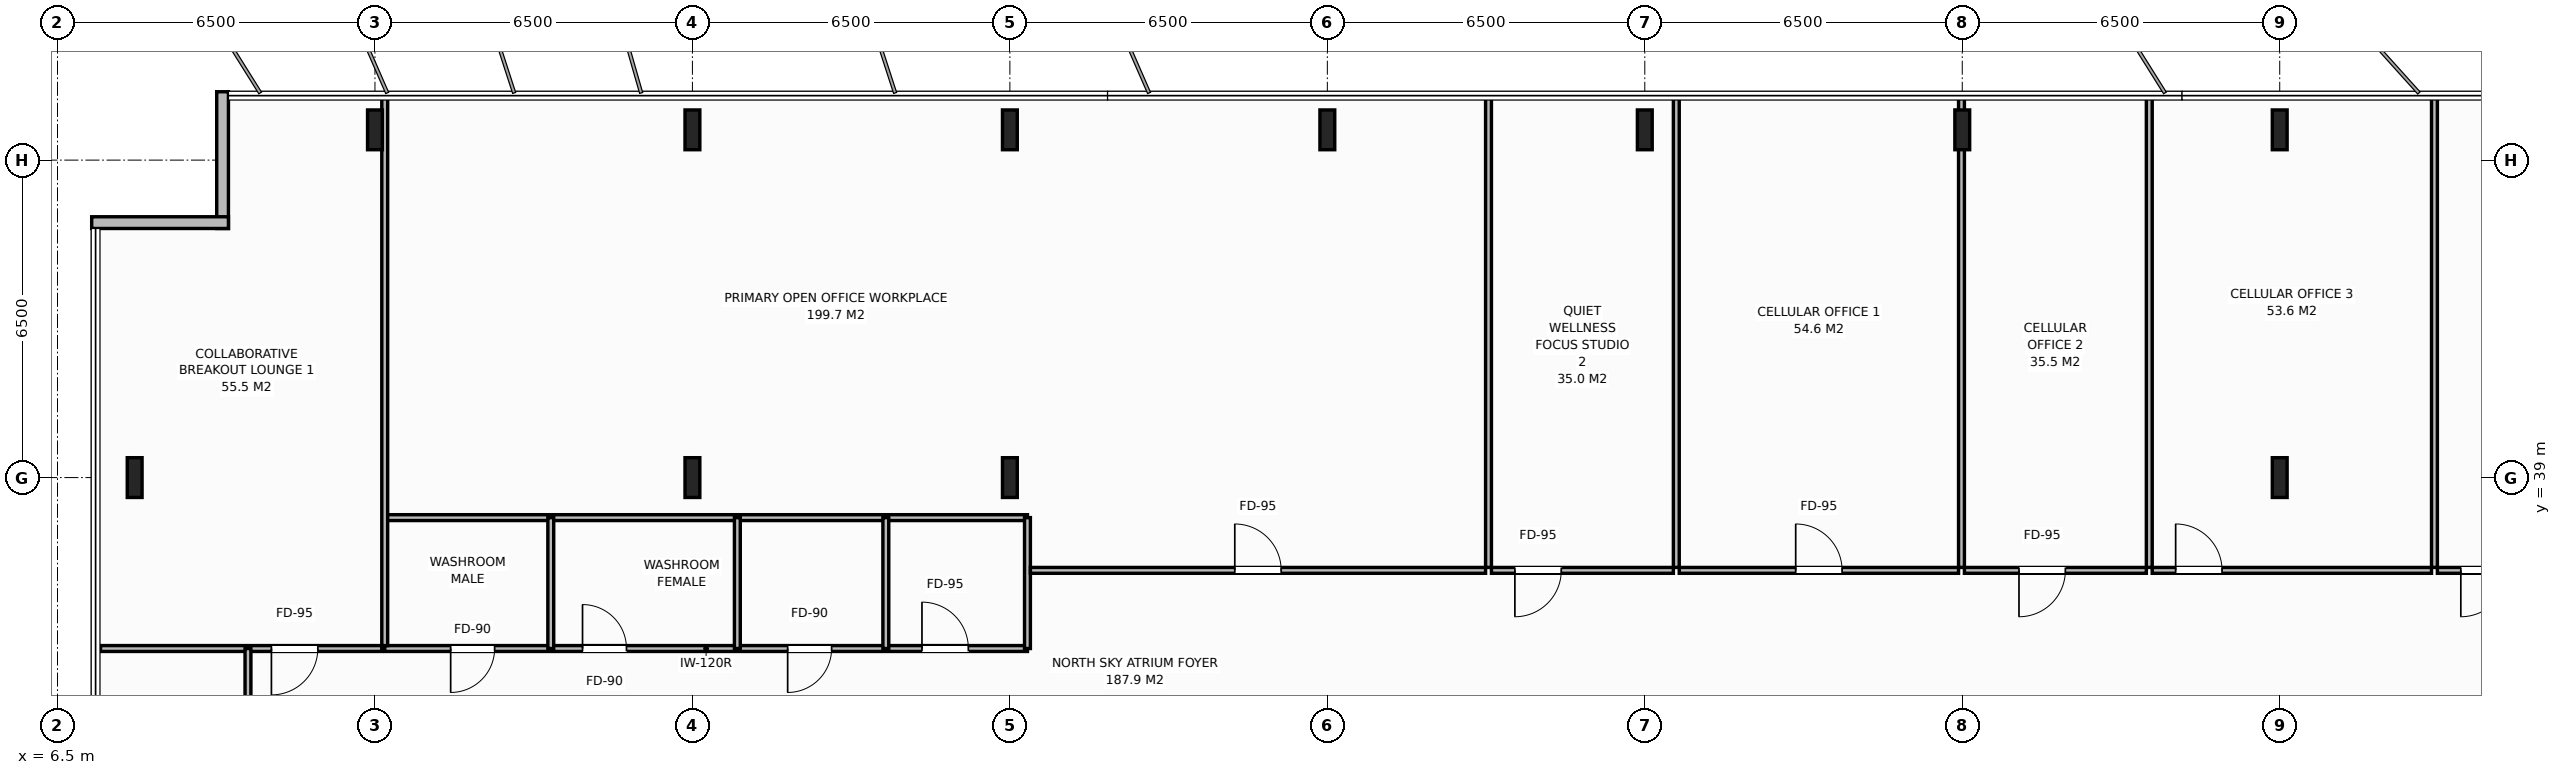
"""IFC4 building model, lengths in metres.
Left out: names, types, materials, properties, quantities, classifications, styles, units other than length and angle.
Written with IfcOpenShell. Run it as: python <this file> out.ifc"""

import sys

from ifc_helpers import new_model, si_unit, direction, frame, frame_2d, origin, origin_2d, place, context, subcontext, project, spatial, rectangle, i_section, extrude, element, fill, save


model = new_model("IFC4")
c1 = context("Model", 3, precision=1e-05, world=origin(), true_north=direction((0.0, 1.0)))
c2 = subcontext(c1, "Body", "Model", "MODEL_VIEW")
j1 = project(units=[si_unit("LENGTHUNIT", "METRE"), si_unit("PLANEANGLEUNIT", "RADIAN")], contexts=[c1])
p1 = place(None, origin())
s1 = spatial("IfcSite", under=j1, at=p1, CompositionType="ELEMENT")
p2 = place(p1, origin())
s2 = spatial("IfcBuilding", under=s1, at=p2, CompositionType="ELEMENT")
p3 = place(p2, frame((0.0, 0.0, 255.6)))
s3 = spatial("IfcBuildingStorey", under=s2, at=p3, CompositionType="ELEMENT", Elevation=255.6)
for number, where, z_axis, x_axis in (
    (1, (19.5, 39.0, 0.0), (0.0, 0.0, 1.0), (1.0, 0.0, 0.0)),
    (2, (26.0, 39.0, 0.0), (0.0, 0.0, 1.0), (1.0, 0.0, 0.0)),
    (3, (52.0, 39.0, 0.0), (0.0, 0.0, 1.0), (1.0, 0.0, 0.0)),
    (4, (13.0, 46.12, 0.0), (0.0, 0.0, 1.0), (1.0, 0.0, 0.0)),
    (5, (19.5, 46.12, 0.0), (0.0, 0.0, 1.0), (1.0, 0.0, 0.0)),
    (6, (26.0, 46.12, 0.0), (0.0, 0.0, 1.0), (1.0, 0.0, 0.0)),
    (7, (32.5, 46.12, 0.0), (0.0, 0.0, 1.0), (1.0, 0.0, 0.0)),
    (8, (39.0, 46.12, 0.0), (0.0, 0.0, 1.0), (1.0, 0.0, 0.0)),
    (9, (45.5, 46.12, 0.0), (0.0, 0.0, 1.0), (1.0, 0.0, 0.0)),
    (10, (52.0, 46.12, 0.0), (0.0, 0.0, 1.0), (1.0, 0.0, 0.0)),
    (11, (8.08, 39.0, 0.0), (0.0, 0.0, 1.0), (1.0, 0.0, 0.0)),
):
    element("IfcColumn", number, at=place(p3, frame(where, z_axis=z_axis, x_axis=x_axis)), inside=s3, PredefinedType="COLUMN", context=c2, shape_type="SweptSolid", body=[
        extrude(i_section(OverallWidth=0.303, OverallDepth=0.814, WebThickness=0.021, FlangeThickness=0.04, at=origin_2d()), origin(), (0.0, 0.0, 1.0), 3.8),
    ])
p4 = place(p3, frame((9.88, 44.1, 0.0), z_axis=(0.0, 0.0, 1.0), x_axis=(0.0, 1.0, 0.0)))
e12 = element("IfcWall", 12, at=p4, inside=s3, PredefinedType="STANDARD", context=c2, shape_type="SweptSolid", body=[
    extrude(rectangle(XDim=2.8, YDim=0.24, at=frame_2d((1.4, 0.0))), origin(), (0.0, 0.0, 1.0), 3.588),
])
p5 = place(p3, frame((7.2, 44.22, 0.0), z_axis=(0.0, 0.0, 1.0), x_axis=(1.0, 0.0, 0.0)))
e13 = element("IfcWall", 13, at=p5, inside=s3, PredefinedType="STANDARD", context=c2, shape_type="SweptSolid", body=[
    extrude(rectangle(XDim=2.8, YDim=0.24, at=frame_2d((1.4, 0.0))), origin(), (0.0, 0.0, 1.0), 3.588),
])
p6 = place(p3, frame((13.2, 35.5, 0.0), z_axis=(0.0, 0.0, 1.0), x_axis=(1.0, 0.0, 0.0)))
e14 = element("IfcWall", 14, at=p6, inside=s3, PredefinedType="PARTITIONING", context=c2, shape_type="SweptSolid", body=[
    extrude(rectangle(XDim=13.16, YDim=0.12, at=frame_2d((6.58, 0.0))), origin(), (0.0, 0.0, 1.0), 3.588),
])
p7 = place(p6, frame((1.35, 0.0, 0.0)))
e15 = element("IfcOpeningElement", 15, at=p7, cuts=e14, PredefinedType="OPENING", context=c2, shape_type="SweptSolid", body=[
    extrude(rectangle(XDim=0.9, YDim=2.15, at=frame_2d((0.45, 1.075))), frame((0.0, 0.07, 0.0), z_axis=(0.0, -1.0, 0.0), x_axis=(1.0, 0.0, 0.0)), (0.0, 0.0, 1.0), 0.14),
])
p8 = place(p6, frame((4.05, 0.0, 0.0)))
e16 = element("IfcOpeningElement", 16, at=p8, cuts=e14, PredefinedType="OPENING", context=c2, shape_type="SweptSolid", body=[
    extrude(rectangle(XDim=0.9, YDim=2.15, at=frame_2d((0.45, 1.075))), frame((0.0, 0.07, 0.0), z_axis=(0.0, -1.0, 0.0), x_axis=(1.0, 0.0, 0.0)), (0.0, 0.0, 1.0), 0.14),
])
p9 = place(p6, frame((8.25, 0.0, 0.0)))
e17 = element("IfcOpeningElement", 17, at=p9, cuts=e14, PredefinedType="OPENING", context=c2, shape_type="SweptSolid", body=[
    extrude(rectangle(XDim=0.9, YDim=2.15, at=frame_2d((0.45, 1.075))), frame((0.0, 0.07, 0.0), z_axis=(0.0, -1.0, 0.0), x_axis=(1.0, 0.0, 0.0)), (0.0, 0.0, 1.0), 0.14),
])
p10 = place(p6, frame((11.0, 0.0, 0.0)))
e18 = element("IfcOpeningElement", 18, at=p10, cuts=e14, PredefinedType="OPENING", context=c2, shape_type="SweptSolid", body=[
    extrude(rectangle(XDim=0.95, YDim=2.15, at=frame_2d((0.475, 1.075))), frame((0.0, 0.07, 0.0), z_axis=(0.0, -1.0, 0.0), x_axis=(1.0, 0.0, 0.0)), (0.0, 0.0, 1.0), 0.14),
])
p11 = place(p3, frame((13.2, 38.18, 0.0), z_axis=(0.0, 0.0, 1.0), x_axis=(1.0, 0.0, 0.0)))
e19 = element("IfcWall", 19, at=p11, inside=s3, PredefinedType="PARTITIONING", context=c2, shape_type="SweptSolid", body=[
    extrude(rectangle(XDim=13.16, YDim=0.12, at=frame_2d((6.58, 0.0))), origin(), (0.0, 0.0, 1.0), 3.588),
])
for number, where, z_axis, x_axis in (
    (20, (16.6, 35.5, 0.0), (0.0, 0.0, 1.0), (0.0, 1.0, 0.0)),
    (21, (20.42, 35.5, 0.0), (0.0, 0.0, 1.0), (0.0, 1.0, 0.0)),
    (22, (23.46, 35.5, 0.0), (0.0, 0.0, 1.0), (0.0, 1.0, 0.0)),
    (23, (26.36, 35.5, 0.0), (0.0, 0.0, 1.0), (0.0, 1.0, 0.0)),
):
    element("IfcWall", number, at=place(p3, frame(where, z_axis=z_axis, x_axis=x_axis)), inside=s3, PredefinedType="PARTITIONING", context=c2, shape_type="SweptSolid", body=[
        extrude(rectangle(XDim=2.68, YDim=0.12, at=frame_2d((1.34, 0.0))), origin(), (0.0, 0.0, 1.0), 3.588),
    ])
p12 = place(p3, frame((13.2, 35.56, 0.0), z_axis=(0.0, 0.0, 1.0), x_axis=(0.0, 1.0, 0.0)))
e24 = element("IfcWall", 24, at=p12, inside=s3, PredefinedType="PARTITIONING", context=c2, shape_type="SweptSolid", body=[
    extrude(rectangle(XDim=11.32, YDim=0.12, at=frame_2d((5.66, 0.0))), origin(), (0.0, 0.0, 1.0), 2.788),
])
p13 = place(p3, frame((7.38, 35.5, 0.0), z_axis=(0.0, 0.0, 1.0), x_axis=(1.0, 0.0, 0.0)))
e25 = element("IfcWall", 25, at=p13, inside=s3, PredefinedType="PARTITIONING", context=c2, shape_type="SweptSolid", body=[
    extrude(rectangle(XDim=5.76, YDim=0.12, at=frame_2d((2.88, 0.0))), origin(), (0.0, 0.0, 1.0), 3.588),
])
p14 = place(p13, frame((3.5, 0.0, 0.0)))
e26 = element("IfcOpeningElement", 26, at=p14, cuts=e25, PredefinedType="OPENING", context=c2, shape_type="SweptSolid", body=[
    extrude(rectangle(XDim=0.95, YDim=2.15, at=frame_2d((0.475, 1.075))), frame((0.0, 0.07, 0.0), z_axis=(0.0, -1.0, 0.0), x_axis=(1.0, 0.0, 0.0)), (0.0, 0.0, 1.0), 0.14),
])
p15 = place(p3, frame((35.8, 37.16, 0.0), z_axis=(0.0, 0.0, 1.0), x_axis=(0.0, 1.0, 0.0)))
e27 = element("IfcWall", 27, at=p15, inside=s3, PredefinedType="PARTITIONING", context=c2, shape_type="SweptSolid", body=[
    extrude(rectangle(XDim=9.72, YDim=0.12, at=frame_2d((4.86, 0.0))), origin(), (0.0, 0.0, 1.0), 3.588),
])
p16 = place(p3, frame((26.42, 37.1, 0.0), z_axis=(0.0, 0.0, 1.0), x_axis=(1.0, 0.0, 0.0)))
e28 = element("IfcWall", 28, at=p16, inside=s3, PredefinedType="PARTITIONING", context=c2, shape_type="SweptSolid", body=[
    extrude(rectangle(XDim=9.32, YDim=0.12, at=frame_2d((4.66, 0.0))), origin(), (0.0, 0.0, 1.0), 3.588),
])
p17 = place(p16, frame((4.185, 0.0, 0.0)))
e29 = element("IfcOpeningElement", 29, at=p17, cuts=e28, PredefinedType="OPENING", context=c2, shape_type="SweptSolid", body=[
    extrude(rectangle(XDim=0.95, YDim=2.15, at=frame_2d((0.475, 1.075))), frame((0.0, 0.07, 0.0), z_axis=(0.0, -1.0, 0.0), x_axis=(1.0, 0.0, 0.0)), (0.0, 0.0, 1.0), 0.14),
])
p18 = place(p3, frame((39.645, 37.16, 0.0), z_axis=(0.0, 0.0, 1.0), x_axis=(0.0, 1.0, 0.0)))
e30 = element("IfcWall", 30, at=p18, inside=s3, PredefinedType="PARTITIONING", context=c2, shape_type="SweptSolid", body=[
    extrude(rectangle(XDim=9.72, YDim=0.12, at=frame_2d((4.86, 0.0))), origin(), (0.0, 0.0, 1.0), 3.588),
])
p19 = place(p3, frame((35.86, 37.1, 0.0), z_axis=(0.0, 0.0, 1.0), x_axis=(1.0, 0.0, 0.0)))
e31 = element("IfcWall", 31, at=p19, inside=s3, PredefinedType="PARTITIONING", context=c2, shape_type="SweptSolid", body=[
    extrude(rectangle(XDim=3.725, YDim=0.12, at=frame_2d((1.863, 0.0))), origin(), (0.0, 0.0, 1.0), 3.588),
])
p20 = place(p19, frame((0.48, 0.0, 0.0)))
e32 = element("IfcOpeningElement", 32, at=p20, cuts=e31, PredefinedType="OPENING", context=c2, shape_type="SweptSolid", body=[
    extrude(rectangle(XDim=0.95, YDim=2.15, at=frame_2d((0.475, 1.075))), frame((0.0, 0.07, 0.0), z_axis=(0.0, -1.0, 0.0), x_axis=(1.0, 0.0, 0.0)), (0.0, 0.0, 1.0), 0.14),
])
p21 = place(p3, frame((45.484, 37.16, 0.0), z_axis=(0.0, 0.0, 1.0), x_axis=(0.0, 1.0, 0.0)))
e33 = element("IfcWall", 33, at=p21, inside=s3, PredefinedType="PARTITIONING", context=c2, shape_type="SweptSolid", body=[
    extrude(rectangle(XDim=9.72, YDim=0.12, at=frame_2d((4.86, 0.0))), origin(), (0.0, 0.0, 1.0), 2.788),
])
p22 = place(p3, frame((39.705, 37.1, 0.0), z_axis=(0.0, 0.0, 1.0), x_axis=(1.0, 0.0, 0.0)))
e34 = element("IfcWall", 34, at=p22, inside=s3, PredefinedType="PARTITIONING", context=c2, shape_type="SweptSolid", body=[
    extrude(rectangle(XDim=5.719, YDim=0.12, at=frame_2d((2.859, 0.0))), origin(), (0.0, 0.0, 1.0), 3.588),
])
p23 = place(p22, frame((2.385, 0.0, 0.0)))
e35 = element("IfcOpeningElement", 35, at=p23, cuts=e34, PredefinedType="OPENING", context=c2, shape_type="SweptSolid", body=[
    extrude(rectangle(XDim=0.95, YDim=2.15, at=frame_2d((0.475, 1.075))), frame((0.0, 0.07, 0.0), z_axis=(0.0, -1.0, 0.0), x_axis=(1.0, 0.0, 0.0)), (0.0, 0.0, 1.0), 0.14),
])
p24 = place(p3, frame((49.329, 37.16, 0.0), z_axis=(0.0, 0.0, 1.0), x_axis=(0.0, 1.0, 0.0)))
e36 = element("IfcWall", 36, at=p24, inside=s3, PredefinedType="PARTITIONING", context=c2, shape_type="SweptSolid", body=[
    extrude(rectangle(XDim=9.72, YDim=0.12, at=frame_2d((4.86, 0.0))), origin(), (0.0, 0.0, 1.0), 3.588),
])
p25 = place(p3, frame((45.544, 37.1, 0.0), z_axis=(0.0, 0.0, 1.0), x_axis=(1.0, 0.0, 0.0)))
e37 = element("IfcWall", 37, at=p25, inside=s3, PredefinedType="PARTITIONING", context=c2, shape_type="SweptSolid", body=[
    extrude(rectangle(XDim=3.725, YDim=0.12, at=frame_2d((1.863, 0.0))), origin(), (0.0, 0.0, 1.0), 3.588),
])
p26 = place(p25, frame((1.117, 0.0, 0.0)))
e38 = element("IfcOpeningElement", 38, at=p26, cuts=e37, PredefinedType="OPENING", context=c2, shape_type="SweptSolid", body=[
    extrude(rectangle(XDim=0.95, YDim=2.15, at=frame_2d((0.475, 1.075))), frame((0.0, 0.07, 0.0), z_axis=(0.0, -1.0, 0.0), x_axis=(1.0, 0.0, 0.0)), (0.0, 0.0, 1.0), 0.14),
])
p27 = place(p3, frame((55.168, 37.16, 0.0), z_axis=(0.0, 0.0, 1.0), x_axis=(0.0, 1.0, 0.0)))
e39 = element("IfcWall", 39, at=p27, inside=s3, PredefinedType="PARTITIONING", context=c2, shape_type="SweptSolid", body=[
    extrude(rectangle(XDim=9.72, YDim=0.12, at=frame_2d((4.86, 0.0))), origin(), (0.0, 0.0, 1.0), 3.588),
])
p28 = place(p3, frame((49.389, 37.1, 0.0), z_axis=(0.0, 0.0, 1.0), x_axis=(1.0, 0.0, 0.0)))
e40 = element("IfcWall", 40, at=p28, inside=s3, PredefinedType="PARTITIONING", context=c2, shape_type="SweptSolid", body=[
    extrude(rectangle(XDim=5.719, YDim=0.12, at=frame_2d((2.859, 0.0))), origin(), (0.0, 0.0, 1.0), 3.588),
])
p29 = place(p28, frame((0.48, 0.0, 0.0)))
e41 = element("IfcOpeningElement", 41, at=p29, cuts=e40, PredefinedType="OPENING", context=c2, shape_type="SweptSolid", body=[
    extrude(rectangle(XDim=0.95, YDim=2.15, at=frame_2d((0.475, 1.075))), frame((0.0, 0.07, 0.0), z_axis=(0.0, -1.0, 0.0), x_axis=(1.0, 0.0, 0.0)), (0.0, 0.0, 1.0), 0.14),
])
p30 = place(p3, frame((55.228, 37.1, 0.0), z_axis=(0.0, 0.0, 1.0), x_axis=(1.0, 0.0, 0.0)))
e42 = element("IfcWall", 42, at=p30, inside=s3, PredefinedType="PARTITIONING", context=c2, shape_type="SweptSolid", body=[
    extrude(rectangle(XDim=3.725, YDim=0.12, at=frame_2d((1.863, 0.0))), origin(), (0.0, 0.0, 1.0), 3.588),
])
p31 = place(p30, frame((0.48, 0.0, 0.0)))
e43 = element("IfcOpeningElement", 43, at=p31, cuts=e42, PredefinedType="OPENING", context=c2, shape_type="SweptSolid", body=[
    extrude(rectangle(XDim=0.95, YDim=2.15, at=frame_2d((0.475, 1.075))), frame((0.0, 0.07, 0.0), z_axis=(0.0, -1.0, 0.0), x_axis=(1.0, 0.0, 0.0)), (0.0, 0.0, 1.0), 0.14),
])
p32 = place(p3, frame((10.4, 29.167, 0.0), z_axis=(0.0, 0.0, 1.0), x_axis=(0.0, 1.0, 0.0)))
e44 = element("IfcWall", 44, at=p32, inside=s3, PredefinedType="PARTITIONING", context=c2, shape_type="SweptSolid", body=[
    extrude(rectangle(XDim=6.333, YDim=0.12, at=frame_2d((3.167, 0.0))), origin(), (0.0, 0.0, 1.0), 3.588),
])
p33 = place(p32, frame((1.642, 0.0, 0.0)))
e45 = element("IfcOpeningElement", 45, at=p33, cuts=e44, PredefinedType="OPENING", context=c2, shape_type="SweptSolid", body=[
    extrude(rectangle(XDim=0.95, YDim=2.15, at=frame_2d((0.475, 1.075))), frame((0.0, 0.07, 0.0), z_axis=(0.0, -1.0, 0.0), x_axis=(1.0, 0.0, 0.0)), (0.0, 0.0, 1.0), 0.14),
])
p34 = place(p7, origin())
e46 = element("IfcDoor", 46, at=p34, inside=s3, OperationType="SINGLE_SWING_RIGHT", PredefinedType="DOOR", context=c2, shape_type="SweptSolid", body=[
    extrude(rectangle(XDim=0.9, YDim=2.15, at=frame_2d((0.45, 1.075))), frame((0.0, 0.025, 0.0), z_axis=(0.0, -1.0, 0.0), x_axis=(1.0, 0.0, 0.0)), (0.0, 0.0, 1.0), 0.05),
])
fill(e15, e46)
p35 = place(p8, origin())
e47 = element("IfcDoor", 47, at=p35, inside=s3, OperationType="SINGLE_SWING_LEFT", PredefinedType="DOOR", context=c2, shape_type="SweptSolid", body=[
    extrude(rectangle(XDim=0.9, YDim=2.15, at=frame_2d((0.45, 1.075))), frame((0.0, 0.025, 0.0), z_axis=(0.0, -1.0, 0.0), x_axis=(1.0, 0.0, 0.0)), (0.0, 0.0, 1.0), 0.05),
])
fill(e16, e47)
p36 = place(p9, origin())
e48 = element("IfcDoor", 48, at=p36, inside=s3, OperationType="SINGLE_SWING_RIGHT", PredefinedType="DOOR", context=c2, shape_type="SweptSolid", body=[
    extrude(rectangle(XDim=0.9, YDim=2.15, at=frame_2d((0.45, 1.075))), frame((0.0, 0.025, 0.0), z_axis=(0.0, -1.0, 0.0), x_axis=(1.0, 0.0, 0.0)), (0.0, 0.0, 1.0), 0.05),
])
fill(e17, e48)
p37 = place(p10, origin())
e49 = element("IfcDoor", 49, at=p37, inside=s3, OperationType="SINGLE_SWING_LEFT", PredefinedType="DOOR", context=c2, shape_type="SweptSolid", body=[
    extrude(rectangle(XDim=0.95, YDim=2.15, at=frame_2d((0.475, 1.075))), frame((0.0, 0.025, 0.0), z_axis=(0.0, -1.0, 0.0), x_axis=(1.0, 0.0, 0.0)), (0.0, 0.0, 1.0), 0.05),
])
fill(e18, e49)
p38 = place(p14, origin())
e50 = element("IfcDoor", 50, at=p38, inside=s3, OperationType="SINGLE_SWING_RIGHT", PredefinedType="DOOR", context=c2, shape_type="SweptSolid", body=[
    extrude(rectangle(XDim=0.95, YDim=2.15, at=frame_2d((0.475, 1.075))), frame((0.0, 0.025, 0.0), z_axis=(0.0, -1.0, 0.0), x_axis=(1.0, 0.0, 0.0)), (0.0, 0.0, 1.0), 0.05),
])
fill(e26, e50)
p39 = place(p17, origin())
e51 = element("IfcDoor", 51, at=p39, inside=s3, OperationType="SINGLE_SWING_LEFT", PredefinedType="DOOR", context=c2, shape_type="SweptSolid", body=[
    extrude(rectangle(XDim=0.95, YDim=2.15, at=frame_2d((0.475, 1.075))), frame((0.0, 0.025, 0.0), z_axis=(0.0, -1.0, 0.0), x_axis=(1.0, 0.0, 0.0)), (0.0, 0.0, 1.0), 0.05),
])
fill(e29, e51)
p40 = place(p20, origin())
e52 = element("IfcDoor", 52, at=p40, inside=s3, OperationType="SINGLE_SWING_RIGHT", PredefinedType="DOOR", context=c2, shape_type="SweptSolid", body=[
    extrude(rectangle(XDim=0.95, YDim=2.15, at=frame_2d((0.475, 1.075))), frame((0.0, 0.025, 0.0), z_axis=(0.0, -1.0, 0.0), x_axis=(1.0, 0.0, 0.0)), (0.0, 0.0, 1.0), 0.05),
])
fill(e32, e52)
p41 = place(p23, origin())
e53 = element("IfcDoor", 53, at=p41, inside=s3, OperationType="SINGLE_SWING_LEFT", PredefinedType="DOOR", context=c2, shape_type="SweptSolid", body=[
    extrude(rectangle(XDim=0.95, YDim=2.15, at=frame_2d((0.475, 1.075))), frame((0.0, 0.025, 0.0), z_axis=(0.0, -1.0, 0.0), x_axis=(1.0, 0.0, 0.0)), (0.0, 0.0, 1.0), 0.05),
])
fill(e35, e53)
p42 = place(p26, origin())
e54 = element("IfcDoor", 54, at=p42, inside=s3, OperationType="SINGLE_SWING_RIGHT", PredefinedType="DOOR", context=c2, shape_type="SweptSolid", body=[
    extrude(rectangle(XDim=0.95, YDim=2.15, at=frame_2d((0.475, 1.075))), frame((0.0, 0.025, 0.0), z_axis=(0.0, -1.0, 0.0), x_axis=(1.0, 0.0, 0.0)), (0.0, 0.0, 1.0), 0.05),
])
fill(e38, e54)
p43 = place(p29, origin())
e55 = element("IfcDoor", 55, at=p43, inside=s3, OperationType="SINGLE_SWING_LEFT", PredefinedType="DOOR", context=c2, shape_type="SweptSolid", body=[
    extrude(rectangle(XDim=0.95, YDim=2.15, at=frame_2d((0.475, 1.075))), frame((0.0, 0.025, 0.0), z_axis=(0.0, -1.0, 0.0), x_axis=(1.0, 0.0, 0.0)), (0.0, 0.0, 1.0), 0.05),
])
fill(e41, e55)
p44 = place(p31, origin())
e56 = element("IfcDoor", 56, at=p44, inside=s3, OperationType="SINGLE_SWING_RIGHT", PredefinedType="DOOR", context=c2, shape_type="SweptSolid", body=[
    extrude(rectangle(XDim=0.95, YDim=2.15, at=frame_2d((0.475, 1.075))), frame((0.0, 0.025, 0.0), z_axis=(0.0, -1.0, 0.0), x_axis=(1.0, 0.0, 0.0)), (0.0, 0.0, 1.0), 0.05),
])
fill(e43, e56)
save(model, sys.argv[1])
